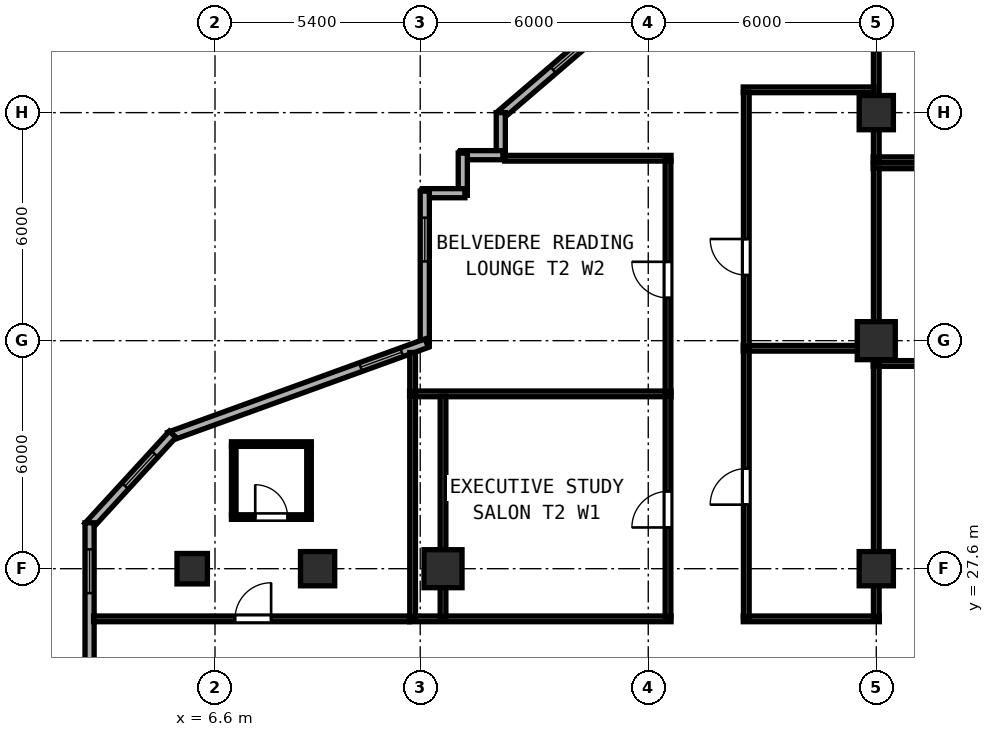
"""IFC4 building model, lengths in metres.
Left out: names, types, materials, properties, quantities, classifications, styles, units other than length and angle.
Written with IfcOpenShell. Run it as: python <this file> out.ifc"""

import sys

from ifc_helpers import new_model, si_unit, direction, frame, frame_2d, origin, origin_2d, place, context, subcontext, project, spatial, rectangle, hollow_rectangle, extrude, element, fill, save


model = new_model("IFC4")
c1 = context("Model", 3, precision=1e-05, world=origin(), true_north=direction((0.0, 1.0)))
c2 = subcontext(c1, "Body", "Model", "MODEL_VIEW")
j1 = project(units=[si_unit("LENGTHUNIT", "METRE"), si_unit("PLANEANGLEUNIT", "RADIAN")], contexts=[c1])
p1 = place(None, origin())
s1 = spatial("IfcSite", under=j1, at=p1, CompositionType="ELEMENT")
p2 = place(p1, origin())
s2 = spatial("IfcBuilding", under=s1, at=p2, CompositionType="ELEMENT")
p3 = place(p2, frame((0.0, 0.0, 98.4)))
s3 = spatial("IfcBuildingStorey", under=s2, at=p3, CompositionType="ELEMENT", Elevation=98.4)
for number, where, z_axis, x_axis in (
    (1, (24.0, 33.6, 0.0), (0.0, 0.0, 1.0), (1.0, 0.0, 0.0)),
    (2, (12.6, 27.6, 0.0), (0.0, 0.0, 1.0), (1.0, 0.0, 0.0)),
):
    element("IfcColumn", number, at=place(p3, frame(where, z_axis=z_axis, x_axis=x_axis)), inside=s3, PredefinedType="COLUMN", context=c2, shape_type="SweptSolid", body=[
        extrude(hollow_rectangle(XDim=1.0, YDim=1.0, WallThickness=0.038, at=origin_2d()), origin(), (0.0, 0.0, 1.0), 3.8),
    ])
p4 = place(p3, frame((6.0, 27.6, 0.0), z_axis=(0.0, 0.0, 1.0), x_axis=(1.0, 0.0, 0.0)))
e3 = element("IfcColumn", 3, at=p4, inside=s3, PredefinedType="COLUMN", context=c2, shape_type="SweptSolid", body=[
    extrude(hollow_rectangle(XDim=0.8, YDim=0.8, WallThickness=0.03, at=origin_2d()), origin(), (0.0, 0.0, 1.0), 3.8),
])
for number, where, z_axis, x_axis in (
    (4, (24.0, 27.6, 0.0), (0.0, 0.0, 1.0), (1.0, 0.0, 0.0)),
    (5, (24.0, 39.6, 0.0), (0.0, 0.0, 1.0), (1.0, 0.0, 0.0)),
    (6, (9.3, 27.6, 0.0), (0.0, 0.0, 1.0), (1.0, 0.0, 0.0)),
):
    element("IfcColumn", number, at=place(p3, frame(where, z_axis=z_axis, x_axis=x_axis)), inside=s3, PredefinedType="COLUMN", context=c2, shape_type="SweptSolid", body=[
        extrude(hollow_rectangle(XDim=0.9, YDim=0.9, WallThickness=0.034, at=origin_2d()), origin(), (0.0, 0.0, 1.0), 3.8),
    ])
p5 = place(p3, frame((16.902, 41.929, 0.0), z_axis=(0.0, 0.0, 1.0), x_axis=(-0.759275136126, -0.650769750112, 0.0)))
e7 = element("IfcWall", 7, at=p5, inside=s3, PredefinedType="SOLIDWALL", context=c2, shape_type="SweptSolid", body=[
    extrude(rectangle(XDim=3.719, YDim=0.24, at=frame_2d((1.86, 0.0))), origin(), (0.0, 0.0, 1.0), 3.6),
])
p6 = place(p5, frame((0.7, 0.0, 0.85)))
e8 = element("IfcOpeningElement", 8, at=p6, cuts=e7, PredefinedType="OPENING", context=c2, shape_type="SweptSolid", body=[
    extrude(rectangle(XDim=1.15, YDim=1.8, at=frame_2d((0.575, 0.9))), frame((0.0, 0.13, 0.0), z_axis=(0.0, -1.0, 0.0), x_axis=(1.0, 0.0, 0.0)), (0.0, 0.0, 1.0), 0.26),
])
p7 = place(p3, frame((14.12, 39.6, 0.0), z_axis=(0.0, 0.0, 1.0), x_axis=(0.0, -1.0, 0.0)))
e9 = element("IfcWall", 9, at=p7, inside=s3, PredefinedType="SOLIDWALL", context=c2, shape_type="SweptSolid", body=[
    extrude(rectangle(XDim=1.175, YDim=0.24, at=frame_2d((0.587, 0.0))), origin(), (0.0, 0.0, 1.0), 3.6),
])
p8 = place(p3, frame((14.175, 38.48, 0.0), z_axis=(0.0, 0.0, 1.0), x_axis=(-1.0, 0.0, 0.0)))
e10 = element("IfcWall", 10, at=p8, inside=s3, PredefinedType="SOLIDWALL", context=c2, shape_type="SweptSolid", body=[
    extrude(rectangle(XDim=1.11, YDim=0.24, at=frame_2d((0.555, 0.0))), origin(), (0.0, 0.0, 1.0), 3.6),
])
p9 = place(p3, frame((13.12, 38.535, 0.0), z_axis=(0.0, 0.0, 1.0), x_axis=(0.0, -1.0, 0.0)))
e11 = element("IfcWall", 11, at=p9, inside=s3, PredefinedType="SOLIDWALL", context=c2, shape_type="SweptSolid", body=[
    extrude(rectangle(XDim=1.11, YDim=0.24, at=frame_2d((0.555, 0.0))), origin(), (0.0, 0.0, 1.0), 3.6),
])
p10 = place(p3, frame((13.175, 37.48, 0.0), z_axis=(0.0, 0.0, 1.0), x_axis=(-1.0, 0.0, 0.0)))
e12 = element("IfcWall", 12, at=p10, inside=s3, PredefinedType="SOLIDWALL", context=c2, shape_type="SweptSolid", body=[
    extrude(rectangle(XDim=1.11, YDim=0.24, at=frame_2d((0.555, 0.0))), origin(), (0.0, 0.0, 1.0), 3.6),
])
p11 = place(p3, frame((12.12, 37.535, 0.0), z_axis=(0.0, 0.0, 1.0), x_axis=(0.0, -1.0, 0.0)))
e13 = element("IfcWall", 13, at=p11, inside=s3, PredefinedType="SOLIDWALL", context=c2, shape_type="SweptSolid", body=[
    extrude(rectangle(XDim=4.074, YDim=0.24, at=frame_2d((2.037, 0.0))), origin(), (0.0, 0.0, 1.0), 3.6),
])
p12 = place(p11, frame((0.7, 0.0, 0.85)))
e14 = element("IfcOpeningElement", 14, at=p12, cuts=e13, PredefinedType="OPENING", context=c2, shape_type="SweptSolid", body=[
    extrude(rectangle(XDim=1.15, YDim=1.8, at=frame_2d((0.575, 0.9))), frame((0.0, 0.13, 0.0), z_axis=(0.0, -1.0, 0.0), x_axis=(1.0, 0.0, 0.0)), (0.0, 0.0, 1.0), 0.26),
])
p13 = place(p3, frame((12.172, 33.535, 0.0), z_axis=(0.0, 0.0, 1.0), x_axis=(-0.940125345433, -0.340828893836, 0.0)))
e15 = element("IfcWall", 15, at=p13, inside=s3, PredefinedType="SOLIDWALL", context=c2, shape_type="SweptSolid", body=[
    extrude(rectangle(XDim=7.206, YDim=0.24, at=frame_2d((3.603, 0.0))), origin(), (0.0, 0.0, 1.0), 3.6),
])
p14 = place(p13, frame((0.7, 0.0, 0.85)))
e16 = element("IfcOpeningElement", 16, at=p14, cuts=e15, PredefinedType="OPENING", context=c2, shape_type="SweptSolid", body=[
    extrude(rectangle(XDim=1.15, YDim=1.8, at=frame_2d((0.575, 0.9))), frame((0.0, 0.13, 0.0), z_axis=(0.0, -1.0, 0.0), x_axis=(1.0, 0.0, 0.0)), (0.0, 0.0, 1.0), 0.26),
])
p15 = place(p3, frame((5.486, 31.138, 0.0), z_axis=(0.0, 0.0, 1.0), x_axis=(-0.675791838304, -0.737092525591, 0.0)))
e17 = element("IfcWall", 17, at=p15, inside=s3, PredefinedType="SOLIDWALL", context=c2, shape_type="SweptSolid", body=[
    extrude(rectangle(XDim=3.29, YDim=0.24, at=frame_2d((1.645, 0.0))), origin(), (0.0, 0.0, 1.0), 3.6),
])
p16 = place(p15, frame((0.7, 0.0, 0.85)))
e18 = element("IfcOpeningElement", 18, at=p16, cuts=e17, PredefinedType="OPENING", context=c2, shape_type="SweptSolid", body=[
    extrude(rectangle(XDim=1.15, YDim=1.8, at=frame_2d((0.575, 0.9))), frame((0.0, 0.13, 0.0), z_axis=(0.0, -1.0, 0.0), x_axis=(1.0, 0.0, 0.0)), (0.0, 0.0, 1.0), 0.26),
])
p17 = place(p3, frame((3.3, 28.808, 0.0), z_axis=(0.0, 0.0, 1.0), x_axis=(0.0, -1.0, 0.0)))
e19 = element("IfcWall", 19, at=p17, inside=s3, PredefinedType="SOLIDWALL", context=c2, shape_type="SweptSolid", body=[
    extrude(rectangle(XDim=20.052, YDim=0.24, at=frame_2d((10.026, 0.0))), origin(), (0.0, 0.0, 1.0), 3.6),
])
p18 = place(p17, frame((0.7, 0.0, 0.85)))
e20 = element("IfcOpeningElement", 20, at=p18, cuts=e19, PredefinedType="OPENING", context=c2, shape_type="SweptSolid", body=[
    extrude(rectangle(XDim=1.15, YDim=1.8, at=frame_2d((0.575, 0.9))), frame((0.0, 0.13, 0.0), z_axis=(0.0, -1.0, 0.0), x_axis=(1.0, 0.0, 0.0)), (0.0, 0.0, 1.0), 0.26),
])
p19 = place(p17, frame((6.1, 0.0, 0.85)))
e21 = element("IfcOpeningElement", 21, at=p19, cuts=e19, PredefinedType="OPENING", context=c2, shape_type="SweptSolid", body=[
    extrude(rectangle(XDim=1.15, YDim=1.8, at=frame_2d((0.575, 0.9))), frame((0.0, 0.13, 0.0), z_axis=(0.0, -1.0, 0.0), x_axis=(1.0, 0.0, 0.0)), (0.0, 0.0, 1.0), 0.26),
])
p20 = place(p17, frame((11.5, 0.0, 0.85)))
e22 = element("IfcOpeningElement", 22, at=p20, cuts=e19, PredefinedType="OPENING", context=c2, shape_type="SweptSolid", body=[
    extrude(rectangle(XDim=1.15, YDim=1.8, at=frame_2d((0.575, 0.9))), frame((0.0, 0.13, 0.0), z_axis=(0.0, -1.0, 0.0), x_axis=(1.0, 0.0, 0.0)), (0.0, 0.0, 1.0), 0.26),
])
p21 = place(p17, frame((16.9, 0.0, 0.85)))
e23 = element("IfcOpeningElement", 23, at=p21, cuts=e19, PredefinedType="OPENING", context=c2, shape_type="SweptSolid", body=[
    extrude(rectangle(XDim=1.15, YDim=1.8, at=frame_2d((0.575, 0.9))), frame((0.0, 0.13, 0.0), z_axis=(0.0, -1.0, 0.0), x_axis=(1.0, 0.0, 0.0)), (0.0, 0.0, 1.0), 0.26),
])
for number, where, z_axis, x_axis in (
    (24, (23.92, 38.2, 0.0), (0.0, 0.0, 1.0), (1.0, 0.0, 0.0)),
    (25, (23.92, 33.0, 0.0), (0.0, 0.0, 1.0), (1.0, 0.0, 0.0)),
):
    element("IfcWall", number, at=place(p3, frame(where, z_axis=z_axis, x_axis=x_axis)), inside=s3, PredefinedType="PARTITIONING", context=c2, shape_type="SweptSolid", body=[
        extrude(rectangle(XDim=3.8, YDim=0.15, at=frame_2d((1.9, 0.0))), origin(), (0.0, 0.0, 1.0), 3.6),
    ])
p22 = place(p3, frame((24.0, 33.06, 0.0), z_axis=(0.0, 0.0, 1.0), x_axis=(0.0, 1.0, 0.0)))
e26 = element("IfcWall", 26, at=p22, inside=s3, PredefinedType="PARTITIONING", context=c2, shape_type="SweptSolid", body=[
    extrude(rectangle(XDim=5.08, YDim=0.15, at=frame_2d((2.54, 0.0))), origin(), (0.0, 0.0, 1.0), 3.145),
])
p23 = place(p3, frame((23.92, 38.36, 0.0), z_axis=(0.0, 0.0, 1.0), x_axis=(1.0, 0.0, 0.0)))
e27 = element("IfcWall", 27, at=p23, inside=s3, PredefinedType="PARTITIONING", context=c2, shape_type="SweptSolid", body=[
    extrude(rectangle(XDim=3.8, YDim=0.15, at=frame_2d((1.9, 0.0))), origin(), (0.0, 0.0, 1.0), 3.6),
])
p24 = place(p3, frame((24.0, 38.42, 0.0), z_axis=(0.0, 0.0, 1.0), x_axis=(0.0, 1.0, 0.0)))
e28 = element("IfcWall", 28, at=p24, inside=s3, PredefinedType="PARTITIONING", context=c2, shape_type="SweptSolid", body=[
    extrude(rectangle(XDim=5.743, YDim=0.15, at=frame_2d((2.872, 0.0))), origin(), (0.0, 0.0, 1.0), 3.145),
])
for number, where, z_axis, x_axis in (
    (29, (11.72, 32.2, 0.0), (0.0, 0.0, 1.0), (1.0, 0.0, 0.0)),
    (30, (11.72, 26.28, 0.0), (0.0, 0.0, 1.0), (1.0, 0.0, 0.0)),
):
    element("IfcWall", number, at=place(p3, frame(where, z_axis=z_axis, x_axis=x_axis)), inside=s3, PredefinedType="PARTITIONING", context=c2, shape_type="SweptSolid", body=[
        extrude(rectangle(XDim=6.88, YDim=0.15, at=frame_2d((3.44, 0.0))), origin(), (0.0, 0.0, 1.0), 3.6),
    ])
p25 = place(p3, frame((11.8, 26.34, 0.0), z_axis=(0.0, 0.0, 1.0), x_axis=(0.0, 1.0, 0.0)))
e31 = element("IfcWall", 31, at=p25, inside=s3, PredefinedType="PARTITIONING", context=c2, shape_type="SweptSolid", body=[
    extrude(rectangle(XDim=5.8, YDim=0.15, at=frame_2d((2.9, 0.0))), origin(), (0.0, 0.0, 1.0), 3.6),
])
p26 = place(p3, frame((18.52, 26.34, 0.0), z_axis=(0.0, 0.0, 1.0), x_axis=(0.0, 1.0, 0.0)))
e32 = element("IfcWall", 32, at=p26, inside=s3, PredefinedType="PARTITIONING", context=c2, shape_type="SweptSolid", body=[
    extrude(rectangle(XDim=5.8, YDim=0.15, at=frame_2d((2.9, 0.0))), origin(), (0.0, 0.0, 1.0), 3.6),
])
p27 = place(p26, frame((3.295, 0.0, 0.0), z_axis=(0.0, 0.0, 1.0), x_axis=(-1.0, 0.0, 0.0)))
e33 = element("IfcOpeningElement", 33, at=p27, cuts=e32, PredefinedType="OPENING", context=c2, shape_type="SweptSolid", body=[
    extrude(rectangle(XDim=0.95, YDim=2.12, at=frame_2d((0.475, 1.06))), frame((0.0, 0.085, 0.0), z_axis=(0.0, -1.0, 0.0), x_axis=(1.0, 0.0, 0.0)), (0.0, 0.0, 1.0), 0.17),
])
p28 = place(p3, frame((14.225, 38.4, 0.0), z_axis=(0.0, 0.0, 1.0), x_axis=(1.0, 0.0, 0.0)))
e34 = element("IfcWall", 34, at=p28, inside=s3, PredefinedType="PARTITIONING", context=c2, shape_type="SweptSolid", body=[
    extrude(rectangle(XDim=4.375, YDim=0.15, at=frame_2d((2.188, 0.0))), origin(), (0.0, 0.0, 1.0), 3.6),
])
p29 = place(p3, frame((11.8, 32.26, 0.0), z_axis=(0.0, 0.0, 1.0), x_axis=(0.0, 1.0, 0.0)))
e35 = element("IfcWall", 35, at=p29, inside=s3, PredefinedType="PARTITIONING", context=c2, shape_type="SweptSolid", body=[
    extrude(rectangle(XDim=1.028, YDim=0.15, at=frame_2d((0.514, 0.0))), origin(), (0.0, 0.0, 1.0), 3.6),
])
p30 = place(p3, frame((18.52, 32.26, 0.0), z_axis=(0.0, 0.0, 1.0), x_axis=(0.0, 1.0, 0.0)))
e36 = element("IfcWall", 36, at=p30, inside=s3, PredefinedType="PARTITIONING", context=c2, shape_type="SweptSolid", body=[
    extrude(rectangle(XDim=6.08, YDim=0.15, at=frame_2d((3.04, 0.0))), origin(), (0.0, 0.0, 1.0), 3.6),
])
p31 = place(p30, frame((3.415, 0.0, 0.0), z_axis=(0.0, 0.0, 1.0), x_axis=(-1.0, 0.0, 0.0)))
e37 = element("IfcOpeningElement", 37, at=p31, cuts=e36, PredefinedType="OPENING", context=c2, shape_type="SweptSolid", body=[
    extrude(rectangle(XDim=0.95, YDim=2.12, at=frame_2d((0.475, 1.06))), frame((0.0, 0.085, 0.0), z_axis=(0.0, -1.0, 0.0), x_axis=(1.0, 0.0, 0.0)), (0.0, 0.0, 1.0), 0.17),
])
p32 = place(p3, frame((20.5, 33.4, 0.0), z_axis=(0.0, 0.0, 1.0), x_axis=(1.0, 0.0, 0.0)))
e38 = element("IfcWall", 38, at=p32, inside=s3, PredefinedType="PARTITIONING", context=c2, shape_type="SweptSolid", body=[
    extrude(rectangle(XDim=3.44, YDim=0.15, at=frame_2d((1.72, 0.0))), origin(), (0.0, 0.0, 1.0), 3.6),
])
p33 = place(p3, frame((20.5, 26.28, 0.0), z_axis=(0.0, 0.0, 1.0), x_axis=(1.0, 0.0, 0.0)))
e39 = element("IfcWall", 39, at=p33, inside=s3, PredefinedType="PARTITIONING", context=c2, shape_type="SweptSolid", body=[
    extrude(rectangle(XDim=3.58, YDim=0.15, at=frame_2d((1.79, 0.0))), origin(), (0.0, 0.0, 1.0), 3.6),
])
p34 = place(p3, frame((20.58, 26.34, 0.0), z_axis=(0.0, 0.0, 1.0), x_axis=(0.0, 1.0, 0.0)))
e40 = element("IfcWall", 40, at=p34, inside=s3, PredefinedType="PARTITIONING", context=c2, shape_type="SweptSolid", body=[
    extrude(rectangle(XDim=7.0, YDim=0.15, at=frame_2d((3.5, 0.0))), origin(), (0.0, 0.0, 1.0), 3.6),
])
p35 = place(p34, frame((2.945, 0.0, 0.0)))
e41 = element("IfcOpeningElement", 41, at=p35, cuts=e40, PredefinedType="OPENING", context=c2, shape_type="SweptSolid", body=[
    extrude(rectangle(XDim=0.95, YDim=2.12, at=frame_2d((0.475, 1.06))), frame((0.0, 0.085, 0.0), z_axis=(0.0, -1.0, 0.0), x_axis=(1.0, 0.0, 0.0)), (0.0, 0.0, 1.0), 0.17),
])
p36 = place(p3, frame((24.0, 26.34, 0.0), z_axis=(0.0, 0.0, 1.0), x_axis=(0.0, 1.0, 0.0)))
e42 = element("IfcWall", 42, at=p36, inside=s3, PredefinedType="PARTITIONING", context=c2, shape_type="SweptSolid", body=[
    extrude(rectangle(XDim=6.6, YDim=0.15, at=frame_2d((3.3, 0.0))), origin(), (0.0, 0.0, 1.0), 3.145),
])
p37 = place(p3, frame((20.5, 40.2, 0.0), z_axis=(0.0, 0.0, 1.0), x_axis=(1.0, 0.0, 0.0)))
e43 = element("IfcWall", 43, at=p37, inside=s3, PredefinedType="PARTITIONING", context=c2, shape_type="SweptSolid", body=[
    extrude(rectangle(XDim=3.44, YDim=0.15, at=frame_2d((1.72, 0.0))), origin(), (0.0, 0.0, 1.0), 3.6),
])
p38 = place(p3, frame((20.58, 33.46, 0.0), z_axis=(0.0, 0.0, 1.0), x_axis=(0.0, 1.0, 0.0)))
e44 = element("IfcWall", 44, at=p38, inside=s3, PredefinedType="PARTITIONING", context=c2, shape_type="SweptSolid", body=[
    extrude(rectangle(XDim=6.68, YDim=0.15, at=frame_2d((3.34, 0.0))), origin(), (0.0, 0.0, 1.0), 3.6),
])
p39 = place(p38, frame((1.865, 0.0, 0.0)))
e45 = element("IfcOpeningElement", 45, at=p39, cuts=e44, PredefinedType="OPENING", context=c2, shape_type="SweptSolid", body=[
    extrude(rectangle(XDim=0.95, YDim=2.12, at=frame_2d((0.475, 1.06))), frame((0.0, 0.085, 0.0), z_axis=(0.0, -1.0, 0.0), x_axis=(1.0, 0.0, 0.0)), (0.0, 0.0, 1.0), 0.17),
])
p40 = place(p3, frame((3.405, 26.28, 0.0), z_axis=(0.0, 0.0, 1.0), x_axis=(1.0, 0.0, 0.0)))
e46 = element("IfcWall", 46, at=p40, inside=s3, PredefinedType="PARTITIONING", context=c2, shape_type="SweptSolid", body=[
    extrude(rectangle(XDim=8.313, YDim=0.15, at=frame_2d((4.156, 0.0))), origin(), (0.0, 0.0, 1.0), 3.6),
])
p41 = place(p40, frame((3.722, 0.0, 0.0)))
e47 = element("IfcOpeningElement", 47, at=p41, cuts=e46, PredefinedType="OPENING", context=c2, shape_type="SweptSolid", body=[
    extrude(rectangle(XDim=0.95, YDim=2.15, at=frame_2d((0.475, 1.075))), frame((0.0, 0.085, 0.0), z_axis=(0.0, -1.0, 0.0), x_axis=(1.0, 0.0, 0.0)), (0.0, 0.0, 1.0), 0.17),
])
p42 = place(p3, frame((12.6, 26.34, 0.0), z_axis=(0.0, 0.0, 1.0), x_axis=(0.0, 1.0, 0.0)))
e48 = element("IfcWall", 48, at=p42, inside=s3, PredefinedType="PARTITIONING", context=c2, shape_type="SweptSolid", body=[
    extrude(rectangle(XDim=5.8, YDim=0.15, at=frame_2d((2.9, 0.0))), origin(), (0.0, 0.0, 1.0), 3.145),
])
p43 = place(p3, frame((7.034, 30.879, 0.0), z_axis=(0.0, 0.0, 1.0), x_axis=(1.0, 0.0, 0.0)))
e49 = element("IfcWall", 49, at=p43, inside=s3, PredefinedType="PARTITIONING", context=c2, shape_type="SweptSolid", body=[
    extrude(rectangle(XDim=2.1, YDim=0.12, at=frame_2d((1.05, 0.0))), origin(), (0.0, 0.0, 1.0), 3.6),
])
p44 = place(p3, frame((7.034, 28.959, 0.0), z_axis=(0.0, 0.0, 1.0), x_axis=(1.0, 0.0, 0.0)))
e50 = element("IfcWall", 50, at=p44, inside=s3, PredefinedType="PARTITIONING", context=c2, shape_type="SweptSolid", body=[
    extrude(rectangle(XDim=2.1, YDim=0.12, at=frame_2d((1.05, 0.0))), origin(), (0.0, 0.0, 1.0), 3.6),
])
p45 = place(p44, frame((0.625, 0.0, 0.0)))
e51 = element("IfcOpeningElement", 51, at=p45, cuts=e50, PredefinedType="OPENING", context=c2, shape_type="SweptSolid", body=[
    extrude(rectangle(XDim=0.85, YDim=2.1, at=frame_2d((0.425, 1.05))), frame((0.0, 0.07, 0.0), z_axis=(0.0, -1.0, 0.0), x_axis=(1.0, 0.0, 0.0)), (0.0, 0.0, 1.0), 0.14),
])
for number, where, z_axis, x_axis in (
    (52, (7.094, 29.004, 0.0), (0.0, 0.0, 1.0), (0.0, 1.0, 0.0)),
    (53, (9.074, 29.004, 0.0), (0.0, 0.0, 1.0), (0.0, 1.0, 0.0)),
):
    element("IfcWall", number, at=place(p3, frame(where, z_axis=z_axis, x_axis=x_axis)), inside=s3, PredefinedType="PARTITIONING", context=c2, shape_type="SweptSolid", body=[
        extrude(rectangle(XDim=1.83, YDim=0.12, at=frame_2d((0.915, 0.0))), origin(), (0.0, 0.0, 1.0), 3.6),
    ])
p46 = place(p6, origin())
e54 = element("IfcWindow", 54, at=p46, inside=s3, PartitioningType="SINGLE_PANEL", PredefinedType="WINDOW", context=c2, shape_type="SweptSolid", body=[
    extrude(rectangle(XDim=1.15, YDim=1.8, at=frame_2d((0.575, 0.9))), frame((0.0, 0.03, 0.0), z_axis=(0.0, -1.0, 0.0), x_axis=(1.0, 0.0, 0.0)), (0.0, 0.0, 1.0), 0.06),
])
fill(e8, e54)
p47 = place(p12, origin())
e55 = element("IfcWindow", 55, at=p47, inside=s3, PartitioningType="SINGLE_PANEL", PredefinedType="WINDOW", context=c2, shape_type="SweptSolid", body=[
    extrude(rectangle(XDim=1.15, YDim=1.8, at=frame_2d((0.575, 0.9))), frame((0.0, 0.03, 0.0), z_axis=(0.0, -1.0, 0.0), x_axis=(1.0, 0.0, 0.0)), (0.0, 0.0, 1.0), 0.06),
])
fill(e14, e55)
p48 = place(p14, origin())
e56 = element("IfcWindow", 56, at=p48, inside=s3, PartitioningType="SINGLE_PANEL", PredefinedType="WINDOW", context=c2, shape_type="SweptSolid", body=[
    extrude(rectangle(XDim=1.15, YDim=1.8, at=frame_2d((0.575, 0.9))), frame((0.0, 0.03, 0.0), z_axis=(0.0, -1.0, 0.0), x_axis=(1.0, 0.0, 0.0)), (0.0, 0.0, 1.0), 0.06),
])
fill(e16, e56)
p49 = place(p16, origin())
e57 = element("IfcWindow", 57, at=p49, inside=s3, PartitioningType="SINGLE_PANEL", PredefinedType="WINDOW", context=c2, shape_type="SweptSolid", body=[
    extrude(rectangle(XDim=1.15, YDim=1.8, at=frame_2d((0.575, 0.9))), frame((0.0, 0.03, 0.0), z_axis=(0.0, -1.0, 0.0), x_axis=(1.0, 0.0, 0.0)), (0.0, 0.0, 1.0), 0.06),
])
fill(e18, e57)
p50 = place(p18, origin())
e58 = element("IfcWindow", 58, at=p50, inside=s3, PartitioningType="SINGLE_PANEL", PredefinedType="WINDOW", context=c2, shape_type="SweptSolid", body=[
    extrude(rectangle(XDim=1.15, YDim=1.8, at=frame_2d((0.575, 0.9))), frame((0.0, 0.03, 0.0), z_axis=(0.0, -1.0, 0.0), x_axis=(1.0, 0.0, 0.0)), (0.0, 0.0, 1.0), 0.06),
])
fill(e20, e58)
p51 = place(p27, origin())
e59 = element("IfcDoor", 59, at=p51, inside=s3, OperationType="SINGLE_SWING_RIGHT", PredefinedType="DOOR", context=c2, shape_type="SweptSolid", body=[
    extrude(rectangle(XDim=0.95, YDim=2.12, at=frame_2d((0.475, 1.06))), frame((0.0, 0.025, 0.0), z_axis=(0.0, -1.0, 0.0), x_axis=(1.0, 0.0, 0.0)), (0.0, 0.0, 1.0), 0.05),
])
fill(e33, e59)
p52 = place(p31, origin())
e60 = element("IfcDoor", 60, at=p52, inside=s3, OperationType="SINGLE_SWING_LEFT", PredefinedType="DOOR", context=c2, shape_type="SweptSolid", body=[
    extrude(rectangle(XDim=0.95, YDim=2.12, at=frame_2d((0.475, 1.06))), frame((0.0, 0.025, 0.0), z_axis=(0.0, -1.0, 0.0), x_axis=(1.0, 0.0, 0.0)), (0.0, 0.0, 1.0), 0.05),
])
fill(e37, e60)
p53 = place(p35, origin())
e61 = element("IfcDoor", 61, at=p53, inside=s3, OperationType="SINGLE_SWING_LEFT", PredefinedType="DOOR", context=c2, shape_type="SweptSolid", body=[
    extrude(rectangle(XDim=0.95, YDim=2.12, at=frame_2d((0.475, 1.06))), frame((0.0, 0.025, 0.0), z_axis=(0.0, -1.0, 0.0), x_axis=(1.0, 0.0, 0.0)), (0.0, 0.0, 1.0), 0.05),
])
fill(e41, e61)
p54 = place(p39, origin())
e62 = element("IfcDoor", 62, at=p54, inside=s3, OperationType="SINGLE_SWING_RIGHT", PredefinedType="DOOR", context=c2, shape_type="SweptSolid", body=[
    extrude(rectangle(XDim=0.95, YDim=2.12, at=frame_2d((0.475, 1.06))), frame((0.0, 0.025, 0.0), z_axis=(0.0, -1.0, 0.0), x_axis=(1.0, 0.0, 0.0)), (0.0, 0.0, 1.0), 0.05),
])
fill(e45, e62)
p55 = place(p41, origin())
e63 = element("IfcDoor", 63, at=p55, inside=s3, OperationType="SINGLE_SWING_RIGHT", PredefinedType="DOOR", context=c2, shape_type="SweptSolid", body=[
    extrude(rectangle(XDim=0.95, YDim=2.15, at=frame_2d((0.475, 1.075))), frame((0.0, 0.025, 0.0), z_axis=(0.0, -1.0, 0.0), x_axis=(1.0, 0.0, 0.0)), (0.0, 0.0, 1.0), 0.05),
])
fill(e47, e63)
p56 = place(p45, origin())
e64 = element("IfcDoor", 64, at=p56, inside=s3, OperationType="SINGLE_SWING_LEFT", PredefinedType="DOOR", context=c2, shape_type="SweptSolid", body=[
    extrude(rectangle(XDim=0.85, YDim=2.1, at=frame_2d((0.425, 1.05))), frame((0.0, 0.025, 0.0), z_axis=(0.0, -1.0, 0.0), x_axis=(1.0, 0.0, 0.0)), (0.0, 0.0, 1.0), 0.05),
])
fill(e51, e64)
save(model, sys.argv[1])
